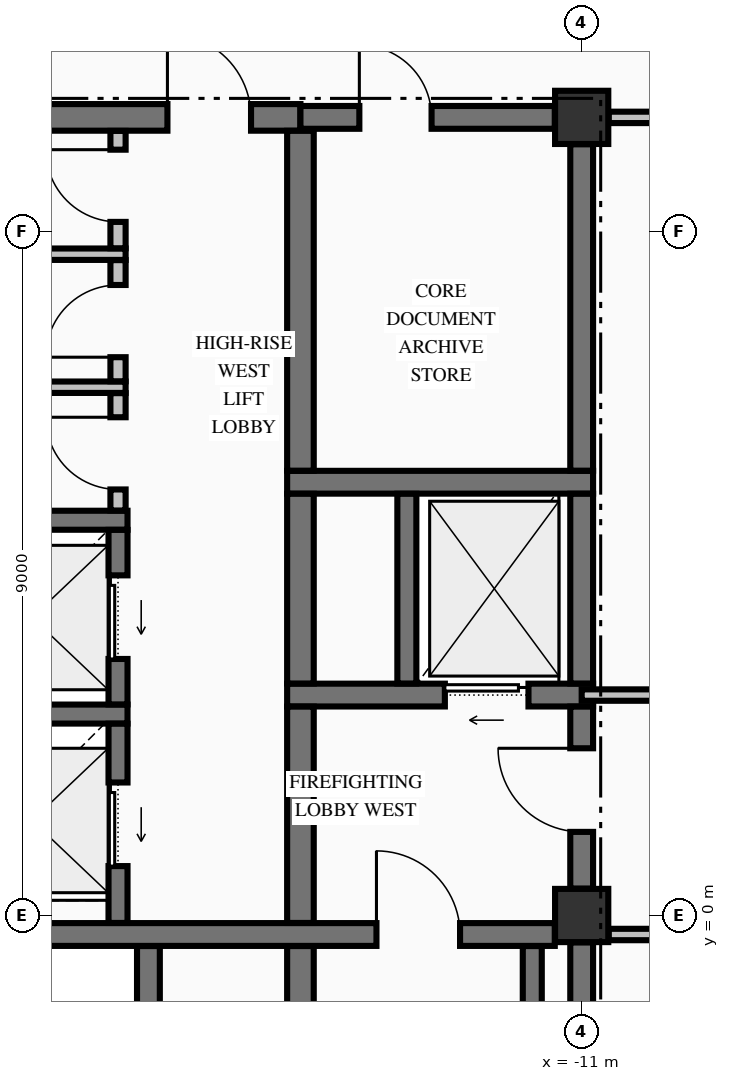
"""IFC4 building model, lengths in metres.
Left out: names, types, materials, properties, quantities, classifications, styles, units other than length and angle.
Written with IfcOpenShell. Run it as: python <this file> out.ifc"""

import sys

from ifc_helpers import new_model, si_unit, direction, frame, frame_2d, origin, origin_2d, place, context, subcontext, project, spatial, rectangle, extrude, element, fill, save


model = new_model("IFC4")
c1 = context("Model", 3, precision=1e-05, world=origin(), true_north=direction((0.0, 1.0)))
c2 = subcontext(c1, "Body", "Model", "MODEL_VIEW")
j1 = project(units=[si_unit("LENGTHUNIT", "METRE"), si_unit("PLANEANGLEUNIT", "RADIAN")], contexts=[c1])
p1 = place(None, origin())
s1 = spatial("IfcSite", under=j1, at=p1, CompositionType="ELEMENT")
p2 = place(p1, origin())
s2 = spatial("IfcBuilding", under=s1, at=p2, CompositionType="ELEMENT")
p3 = place(p2, frame((0.0, 0.0, 242.97)))
s3 = spatial("IfcBuildingStorey", under=s2, at=p3, CompositionType="ELEMENT", Elevation=242.97)
for number, where, z_axis, x_axis in (
    (1, (-11.0, 0.0, -0.25), (0.0, 0.0, 1.0), (1.0, 0.0, 0.0)),
    (2, (-11.0, 10.5, -0.25), (0.0, 0.0, 1.0), (1.0, 0.0, 0.0)),
):
    element("IfcColumn", number, at=place(p3, frame(where, z_axis=z_axis, x_axis=x_axis)), inside=s3, PredefinedType="COLUMN", context=c2, shape_type="SweptSolid", body=[
        extrude(rectangle(XDim=0.7, YDim=0.7, at=origin_2d()), origin(), (0.0, 0.0, 1.0), 3.23),
    ])
p4 = place(p3, frame((-20.571, -0.25, 0.0), z_axis=(0.0, 0.0, 1.0), x_axis=(1.0, 0.0, 0.0)))
e3 = element("IfcWall", 3, at=p4, inside=s3, PredefinedType="SHEAR", context=c2, shape_type="SweptSolid", body=[
    extrude(rectangle(XDim=9.217, YDim=0.3, at=frame_2d((4.608, 0.0))), origin(), (0.0, 0.0, 1.0), 2.98),
])
p5 = place(p4, frame((6.871, 0.0, 0.0)))
e4 = element("IfcOpeningElement", 4, at=p5, cuts=e3, PredefinedType="OPENING", context=c2, shape_type="SweptSolid", body=[
    extrude(rectangle(XDim=1.1, YDim=2.15, at=frame_2d((0.55, 1.075))), frame((0.0, 0.16, 0.0), z_axis=(0.0, -1.0, 0.0), x_axis=(1.0, 0.0, 0.0)), (0.0, 0.0, 1.0), 0.32),
])
p6 = place(p3, frame((-20.175, 2.65, 0.0), z_axis=(0.0, 0.0, 1.0), x_axis=(1.0, 0.0, 0.0)))
e5 = element("IfcWall", 5, at=p6, inside=s3, PredefinedType="SOLIDWALL", context=c2, shape_type="SweptSolid", body=[
    extrude(rectangle(XDim=3.2, YDim=0.25, at=frame_2d((1.6, 0.0))), origin(), (0.0, 0.0, 1.0), 2.98),
])
p7 = place(p3, frame((-14.875, 2.9, 0.0), z_axis=(0.0, 0.0, 1.0), x_axis=(1.0, 0.0, 0.0)))
e6 = element("IfcWall", 6, at=p7, inside=s3, PredefinedType="SHEAR", context=c2, shape_type="SweptSolid", body=[
    extrude(rectangle(XDim=4.025, YDim=0.3, at=frame_2d((2.012, 0.0))), origin(), (0.0, 0.0, 1.0), 2.98),
])
p8 = place(p7, frame((2.075, 0.0, 0.0)))
e7 = element("IfcOpeningElement", 7, at=p8, cuts=e6, PredefinedType="OPENING", context=c2, shape_type="SweptSolid", body=[
    extrude(rectangle(XDim=1.1, YDim=2.2, at=frame_2d((0.55, 1.1))), frame((0.0, 0.16, 0.0), z_axis=(0.0, -1.0, 0.0), x_axis=(1.0, 0.0, 0.0)), (0.0, 0.0, 1.0), 0.32),
])
p9 = place(p3, frame((-20.175, 5.2, 0.0), z_axis=(0.0, 0.0, 1.0), x_axis=(1.0, 0.0, 0.0)))
e8 = element("IfcWall", 8, at=p9, inside=s3, PredefinedType="SOLIDWALL", context=c2, shape_type="SweptSolid", body=[
    extrude(rectangle(XDim=3.2, YDim=0.25, at=frame_2d((1.6, 0.0))), origin(), (0.0, 0.0, 1.0), 2.98),
])
p10 = place(p3, frame((-14.875, 5.7, 0.0), z_axis=(0.0, 0.0, 1.0), x_axis=(1.0, 0.0, 0.0)))
e9 = element("IfcWall", 9, at=p10, inside=s3, PredefinedType="SHEAR", context=c2, shape_type="SweptSolid", body=[
    extrude(rectangle(XDim=4.025, YDim=0.3, at=frame_2d((2.012, 0.0))), origin(), (0.0, 0.0, 1.0), 2.98),
])
p11 = place(p3, frame((-19.646, 10.5, 0.0), z_axis=(0.0, 0.0, 1.0), x_axis=(1.0, 0.0, 0.0)))
e10 = element("IfcWall", 10, at=p11, inside=s3, PredefinedType="SHEAR", context=c2, shape_type="SweptSolid", body=[
    extrude(rectangle(XDim=4.946, YDim=0.35, at=frame_2d((2.473, 0.0))), origin(), (0.0, 0.0, 1.0), 2.98),
])
p12 = place(p11, frame((3.196, 0.0, 0.0)))
e11 = element("IfcOpeningElement", 11, at=p12, cuts=e10, PredefinedType="OPENING", context=c2, shape_type="SweptSolid", body=[
    extrude(rectangle(XDim=1.1, YDim=2.15, at=frame_2d((0.55, 1.075))), frame((0.0, 0.185, 0.0), z_axis=(0.0, -1.0, 0.0), x_axis=(1.0, 0.0, 0.0)), (0.0, 0.0, 1.0), 0.37),
])
p13 = place(p3, frame((-14.7, 10.5, 0.0), z_axis=(0.0, 0.0, 1.0), x_axis=(1.0, 0.0, 0.0)))
e12 = element("IfcWall", 12, at=p13, inside=s3, PredefinedType="SHEAR", context=c2, shape_type="SweptSolid", body=[
    extrude(rectangle(XDim=3.346, YDim=0.3, at=frame_2d((1.673, 0.0))), origin(), (0.0, 0.0, 1.0), 2.98),
])
p14 = place(p13, frame((0.775, 0.0, 0.0)))
e13 = element("IfcOpeningElement", 13, at=p14, cuts=e12, PredefinedType="OPENING", context=c2, shape_type="SweptSolid", body=[
    extrude(rectangle(XDim=0.95, YDim=2.15, at=frame_2d((0.475, 1.075))), frame((0.0, 0.16, 0.0), z_axis=(0.0, -1.0, 0.0), x_axis=(1.0, 0.0, 0.0)), (0.0, 0.0, 1.0), 0.32),
])
p15 = place(p3, frame((-10.644, -0.25, 0.0), z_axis=(0.0, 0.0, 1.0), x_axis=(1.0, 0.0, 0.0)))
e14 = element("IfcWall", 14, at=p15, inside=s3, PredefinedType="PARTITIONING", context=c2, shape_type="SweptSolid", body=[
    extrude(rectangle(XDim=21.288, YDim=0.15, at=frame_2d((10.644, 0.0))), origin(), (0.0, 0.0, 1.0), 2.98),
])
p16 = place(p15, frame((13.544, 0.0, 0.0)))
e15 = element("IfcOpeningElement", 15, at=p16, cuts=e14, PredefinedType="OPENING", context=c2, shape_type="SweptSolid", body=[
    extrude(rectangle(XDim=1.1, YDim=2.15, at=frame_2d((0.55, 1.075))), frame((0.0, 0.085, 0.0), z_axis=(0.0, -1.0, 0.0), x_axis=(1.0, 0.0, 0.0)), (0.0, 0.0, 1.0), 0.17),
])
p17 = place(p15, frame((5.789, 0.0, 0.0)))
e16 = element("IfcOpeningElement", 16, at=p17, cuts=e14, PredefinedType="OPENING", context=c2, shape_type="SweptSolid", body=[
    extrude(rectangle(XDim=1.05, YDim=2.15, at=frame_2d((0.525, 1.075))), frame((0.0, 0.085, 0.0), z_axis=(0.0, -1.0, 0.0), x_axis=(1.0, 0.0, 0.0)), (0.0, 0.0, 1.0), 0.17),
])
p18 = place(p15, frame((17.949, 0.0, 0.0)))
e17 = element("IfcOpeningElement", 17, at=p18, cuts=e14, PredefinedType="OPENING", context=c2, shape_type="SweptSolid", body=[
    extrude(rectangle(XDim=0.95, YDim=2.15, at=frame_2d((0.475, 1.075))), frame((0.0, 0.085, 0.0), z_axis=(0.0, -1.0, 0.0), x_axis=(1.0, 0.0, 0.0)), (0.0, 0.0, 1.0), 0.17),
])
p19 = place(p3, frame((-11.0, 2.9, 0.0), z_axis=(0.0, 0.0, 1.0), x_axis=(1.0, 0.0, 0.0)))
e18 = element("IfcWall", 18, at=p19, inside=s3, PredefinedType="PARTITIONING", context=c2, shape_type="SweptSolid", body=[
    extrude(rectangle(XDim=22.0, YDim=0.15, at=frame_2d((11.0, 0.0))), origin(), (0.0, 0.0, 1.0), 2.98),
])
p20 = place(p19, frame((13.9, 0.0, 0.0)))
e19 = element("IfcOpeningElement", 19, at=p20, cuts=e18, PredefinedType="OPENING", context=c2, shape_type="SweptSolid", body=[
    extrude(rectangle(XDim=1.1, YDim=2.15, at=frame_2d((0.55, 1.075))), frame((0.0, 0.085, 0.0), z_axis=(0.0, -1.0, 0.0), x_axis=(1.0, 0.0, 0.0)), (0.0, 0.0, 1.0), 0.17),
])
p21 = place(p19, frame((6.145, 0.0, 0.0)))
e20 = element("IfcOpeningElement", 20, at=p21, cuts=e18, PredefinedType="OPENING", context=c2, shape_type="SweptSolid", body=[
    extrude(rectangle(XDim=1.05, YDim=2.15, at=frame_2d((0.525, 1.075))), frame((0.0, 0.085, 0.0), z_axis=(0.0, -1.0, 0.0), x_axis=(1.0, 0.0, 0.0)), (0.0, 0.0, 1.0), 0.17),
])
p22 = place(p19, frame((18.23, 0.0, 0.0)))
e21 = element("IfcOpeningElement", 21, at=p22, cuts=e18, PredefinedType="OPENING", context=c2, shape_type="SweptSolid", body=[
    extrude(rectangle(XDim=1.1, YDim=2.15, at=frame_2d((0.55, 1.075))), frame((0.0, 0.085, 0.0), z_axis=(0.0, -1.0, 0.0), x_axis=(1.0, 0.0, 0.0)), (0.0, 0.0, 1.0), 0.17),
])
for number, where, z_axis, x_axis in (
    (22, (-19.822, 6.95, 0.0), (0.0, 0.0, 1.0), (1.0, 0.0, 0.0)),
    (23, (-19.822, 8.7, 0.0), (0.0, 0.0, 1.0), (1.0, 0.0, 0.0)),
):
    element("IfcWall", number, at=place(p3, frame(where, z_axis=z_axis, x_axis=x_axis)), inside=s3, PredefinedType="PARTITIONING", context=c2, shape_type="SweptSolid", body=[
        extrude(rectangle(XDim=2.822, YDim=0.15, at=frame_2d((1.411, 0.0))), origin(), (0.0, 0.0, 1.0), 2.98),
    ])
p23 = place(p3, frame((-10.644, 10.5, 0.0), z_axis=(0.0, 0.0, 1.0), x_axis=(1.0, 0.0, 0.0)))
e24 = element("IfcWall", 24, at=p23, inside=s3, PredefinedType="PARTITIONING", context=c2, shape_type="SweptSolid", body=[
    extrude(rectangle(XDim=21.288, YDim=0.15, at=frame_2d((10.644, 0.0))), origin(), (0.0, 0.0, 1.0), 2.98),
])
p24 = place(p23, frame((13.544, 0.0, 0.0)))
e25 = element("IfcOpeningElement", 25, at=p24, cuts=e24, PredefinedType="OPENING", context=c2, shape_type="SweptSolid", body=[
    extrude(rectangle(XDim=1.1, YDim=2.15, at=frame_2d((0.55, 1.075))), frame((0.0, 0.085, 0.0), z_axis=(0.0, -1.0, 0.0), x_axis=(1.0, 0.0, 0.0)), (0.0, 0.0, 1.0), 0.17),
])
p25 = place(p3, frame((-17.1, -0.098, 0.0), z_axis=(0.0, 0.0, 1.0), x_axis=(0.0, 1.0, 0.0)))
e26 = element("IfcWall", 26, at=p25, inside=s3, PredefinedType="SOLIDWALL", context=c2, shape_type="SweptSolid", body=[
    extrude(rectangle(XDim=2.621, YDim=0.25, at=frame_2d((1.311, 0.0))), origin(), (0.0, 0.0, 1.0), 2.98),
])
p26 = place(p25, frame((0.748, 0.0, 0.0)))
e27 = element("IfcOpeningElement", 27, at=p26, cuts=e26, PredefinedType="OPENING", context=c2, shape_type="SweptSolid", body=[
    extrude(rectangle(XDim=1.1, YDim=2.2, at=frame_2d((0.55, 1.1))), frame((0.0, 0.135, 0.0), z_axis=(0.0, -1.0, 0.0), x_axis=(1.0, 0.0, 0.0)), (0.0, 0.0, 1.0), 0.27),
])
p27 = place(p3, frame((-17.1, 2.777, 0.0), z_axis=(0.0, 0.0, 1.0), x_axis=(0.0, 1.0, 0.0)))
e28 = element("IfcWall", 28, at=p27, inside=s3, PredefinedType="SOLIDWALL", context=c2, shape_type="SweptSolid", body=[
    extrude(rectangle(XDim=2.296, YDim=0.25, at=frame_2d((1.148, 0.0))), origin(), (0.0, 0.0, 1.0), 2.98),
])
p28 = place(p27, frame((0.598, 0.0, 0.0)))
e29 = element("IfcOpeningElement", 29, at=p28, cuts=e28, PredefinedType="OPENING", context=c2, shape_type="SweptSolid", body=[
    extrude(rectangle(XDim=1.1, YDim=2.2, at=frame_2d((0.55, 1.1))), frame((0.0, 0.135, 0.0), z_axis=(0.0, -1.0, 0.0), x_axis=(1.0, 0.0, 0.0)), (0.0, 0.0, 1.0), 0.27),
])
p29 = place(p3, frame((-16.7, -9.773, 0.0), z_axis=(0.0, 0.0, 1.0), x_axis=(0.0, 1.0, 0.0)))
e30 = element("IfcWall", 30, at=p29, inside=s3, PredefinedType="SHEAR", context=c2, shape_type="SweptSolid", body=[
    extrude(rectangle(XDim=9.371, YDim=0.3, at=frame_2d((4.686, 0.0))), origin(), (0.0, 0.0, 1.0), 2.98),
])
p30 = place(p3, frame((-14.7, -9.773, 0.0), z_axis=(0.0, 0.0, 1.0), x_axis=(0.0, 1.0, 0.0)))
e31 = element("IfcWall", 31, at=p30, inside=s3, PredefinedType="SHEAR", context=c2, shape_type="SweptSolid", body=[
    extrude(rectangle(XDim=9.371, YDim=0.35, at=frame_2d((4.686, 0.0))), origin(), (0.0, 0.0, 1.0), 2.98),
])
p31 = place(p3, frame((-14.7, -0.098, 0.0), z_axis=(0.0, 0.0, 1.0), x_axis=(0.0, 1.0, 0.0)))
e32 = element("IfcWall", 32, at=p31, inside=s3, PredefinedType="SHEAR", context=c2, shape_type="SweptSolid", body=[
    extrude(rectangle(XDim=2.846, YDim=0.35, at=frame_2d((1.423, 0.0))), origin(), (0.0, 0.0, 1.0), 2.98),
])
p32 = place(p3, frame((-14.7, 3.052, 0.0), z_axis=(0.0, 0.0, 1.0), x_axis=(0.0, 1.0, 0.0)))
e33 = element("IfcWall", 33, at=p32, inside=s3, PredefinedType="SHEAR", context=c2, shape_type="SweptSolid", body=[
    extrude(rectangle(XDim=2.496, YDim=0.35, at=frame_2d((1.248, 0.0))), origin(), (0.0, 0.0, 1.0), 2.98),
])
p33 = place(p3, frame((-14.7, 5.852, 0.0), z_axis=(0.0, 0.0, 1.0), x_axis=(0.0, 1.0, 0.0)))
e34 = element("IfcWall", 34, at=p33, inside=s3, PredefinedType="SHEAR", context=c2, shape_type="SweptSolid", body=[
    extrude(rectangle(XDim=4.471, YDim=0.35, at=frame_2d((2.235, 0.0))), origin(), (0.0, 0.0, 1.0), 2.98),
])
p34 = place(p3, frame((-13.3, 3.052, 0.0), z_axis=(0.0, 0.0, 1.0), x_axis=(0.0, 1.0, 0.0)))
e35 = element("IfcWall", 35, at=p34, inside=s3, PredefinedType="SOLIDWALL", context=c2, shape_type="SweptSolid", body=[
    extrude(rectangle(XDim=2.496, YDim=0.25, at=frame_2d((1.248, 0.0))), origin(), (0.0, 0.0, 1.0), 2.98),
])
p35 = place(p3, frame((-11.65, -9.798, 0.0), z_axis=(0.0, 0.0, 1.0), x_axis=(0.0, 1.0, 0.0)))
e36 = element("IfcWall", 36, at=p35, inside=s3, PredefinedType="SOLIDWALL", context=c2, shape_type="SweptSolid", body=[
    extrude(rectangle(XDim=9.396, YDim=0.25, at=frame_2d((4.698, 0.0))), origin(), (0.0, 0.0, 1.0), 2.98),
])
p36 = place(p3, frame((-11.0, -9.596, 0.0), z_axis=(0.0, 0.0, 1.0), x_axis=(0.0, 1.0, 0.0)))
e37 = element("IfcWall", 37, at=p36, inside=s3, PredefinedType="SHEAR", context=c2, shape_type="SweptSolid", body=[
    extrude(rectangle(XDim=9.242, YDim=0.3, at=frame_2d((4.621, 0.0))), origin(), (0.0, 0.0, 1.0), 2.98),
])
p37 = place(p3, frame((-11.0, 0.354, 0.0), z_axis=(0.0, 0.0, 1.0), x_axis=(0.0, 1.0, 0.0)))
e38 = element("IfcWall", 38, at=p37, inside=s3, PredefinedType="SHEAR", context=c2, shape_type="SweptSolid", body=[
    extrude(rectangle(XDim=2.394, YDim=0.3, at=frame_2d((1.197, 0.0))), origin(), (0.0, 0.0, 1.0), 2.98),
])
p38 = place(p37, frame((0.746, 0.0, 0.0)))
e39 = element("IfcOpeningElement", 39, at=p38, cuts=e38, PredefinedType="OPENING", context=c2, shape_type="SweptSolid", body=[
    extrude(rectangle(XDim=1.1, YDim=2.15, at=frame_2d((0.55, 1.075))), frame((0.0, 0.16, 0.0), z_axis=(0.0, -1.0, 0.0), x_axis=(1.0, 0.0, 0.0)), (0.0, 0.0, 1.0), 0.32),
])
p39 = place(p3, frame((-11.0, 3.052, 0.0), z_axis=(0.0, 0.0, 1.0), x_axis=(0.0, 1.0, 0.0)))
e40 = element("IfcWall", 40, at=p39, inside=s3, PredefinedType="SHEAR", context=c2, shape_type="SweptSolid", body=[
    extrude(rectangle(XDim=2.496, YDim=0.3, at=frame_2d((1.248, 0.0))), origin(), (0.0, 0.0, 1.0), 2.98),
])
p40 = place(p3, frame((-11.0, 5.852, 0.0), z_axis=(0.0, 0.0, 1.0), x_axis=(0.0, 1.0, 0.0)))
e41 = element("IfcWall", 41, at=p40, inside=s3, PredefinedType="SHEAR", context=c2, shape_type="SweptSolid", body=[
    extrude(rectangle(XDim=4.294, YDim=0.3, at=frame_2d((2.147, 0.0))), origin(), (0.0, 0.0, 1.0), 2.98),
])
p41 = place(p3, frame((-17.1, 5.328, 0.0), z_axis=(0.0, 0.0, 1.0), x_axis=(0.0, 1.0, 0.0)))
e42 = element("IfcWall", 42, at=p41, inside=s3, PredefinedType="PARTITIONING", context=c2, shape_type="SweptSolid", body=[
    extrude(rectangle(XDim=1.544, YDim=0.2, at=frame_2d((0.772, 0.0))), origin(), (0.0, 0.0, 1.0), 2.98),
])
p42 = place(p41, frame((0.277, 0.0, 0.0)))
e43 = element("IfcOpeningElement", 43, at=p42, cuts=e42, PredefinedType="OPENING", context=c2, shape_type="SweptSolid", body=[
    extrude(rectangle(XDim=0.95, YDim=2.15, at=frame_2d((0.475, 1.075))), frame((0.0, 0.11, 0.0), z_axis=(0.0, -1.0, 0.0), x_axis=(1.0, 0.0, 0.0)), (0.0, 0.0, 1.0), 0.22),
])
p43 = place(p3, frame((-17.1, 7.028, 0.0), z_axis=(0.0, 0.0, 1.0), x_axis=(0.0, 1.0, 0.0)))
e44 = element("IfcWall", 44, at=p43, inside=s3, PredefinedType="PARTITIONING", context=c2, shape_type="SweptSolid", body=[
    extrude(rectangle(XDim=1.594, YDim=0.2, at=frame_2d((0.797, 0.0))), origin(), (0.0, 0.0, 1.0), 2.98),
])
p44 = place(p43, frame((0.317, 0.0, 0.0)))
e45 = element("IfcOpeningElement", 45, at=p44, cuts=e44, PredefinedType="OPENING", context=c2, shape_type="SweptSolid", body=[
    extrude(rectangle(XDim=0.95, YDim=2.15, at=frame_2d((0.475, 1.075))), frame((0.0, 0.11, 0.0), z_axis=(0.0, -1.0, 0.0), x_axis=(1.0, 0.0, 0.0)), (0.0, 0.0, 1.0), 0.22),
])
p45 = place(p3, frame((-17.1, 8.778, 0.0), z_axis=(0.0, 0.0, 1.0), x_axis=(0.0, 1.0, 0.0)))
e46 = element("IfcWall", 46, at=p45, inside=s3, PredefinedType="PARTITIONING", context=c2, shape_type="SweptSolid", body=[
    extrude(rectangle(XDim=1.544, YDim=0.2, at=frame_2d((0.772, 0.0))), origin(), (0.0, 0.0, 1.0), 2.98),
])
p46 = place(p45, frame((0.347, 0.0, 0.0)))
e47 = element("IfcOpeningElement", 47, at=p46, cuts=e46, PredefinedType="OPENING", context=c2, shape_type="SweptSolid", body=[
    extrude(rectangle(XDim=0.95, YDim=2.15, at=frame_2d((0.475, 1.075))), frame((0.0, 0.11, 0.0), z_axis=(0.0, -1.0, 0.0), x_axis=(1.0, 0.0, 0.0)), (0.0, 0.0, 1.0), 0.22),
])
p47 = place(p5, origin())
e48 = element("IfcDoor", 48, at=p47, inside=s3, OperationType="SINGLE_SWING_LEFT", PredefinedType="DOOR", context=c2, shape_type="SweptSolid", body=[
    extrude(rectangle(XDim=1.1, YDim=2.15, at=frame_2d((0.55, 1.075))), frame((0.0, 0.025, 0.0), z_axis=(0.0, -1.0, 0.0), x_axis=(1.0, 0.0, 0.0)), (0.0, 0.0, 1.0), 0.05),
])
fill(e4, e48)
p48 = place(p38, origin())
e49 = element("IfcDoor", 49, at=p48, inside=s3, OperationType="SINGLE_SWING_RIGHT", PredefinedType="DOOR", context=c2, shape_type="SweptSolid", body=[
    extrude(rectangle(XDim=1.1, YDim=2.15, at=frame_2d((0.55, 1.075))), frame((0.0, 0.025, 0.0), z_axis=(0.0, -1.0, 0.0), x_axis=(1.0, 0.0, 0.0)), (0.0, 0.0, 1.0), 0.05),
])
fill(e39, e49)
p49 = place(p8, origin())
e50 = element("IfcDoor", 50, at=p49, inside=s3, OperationType="SLIDING_TO_LEFT", PredefinedType="DOOR", context=c2, shape_type="SweptSolid", body=[
    extrude(rectangle(XDim=1.1, YDim=2.2, at=frame_2d((0.55, 1.1))), frame((0.0, 0.025, 0.0), z_axis=(0.0, -1.0, 0.0), x_axis=(1.0, 0.0, 0.0)), (0.0, 0.0, 1.0), 0.05),
])
fill(e7, e50)
p50 = place(p14, origin())
e51 = element("IfcDoor", 51, at=p50, inside=s3, OperationType="SINGLE_SWING_LEFT", PredefinedType="DOOR", context=c2, shape_type="SweptSolid", body=[
    extrude(rectangle(XDim=0.95, YDim=2.15, at=frame_2d((0.475, 1.075))), frame((0.0, 0.025, 0.0), z_axis=(0.0, -1.0, 0.0), x_axis=(1.0, 0.0, 0.0)), (0.0, 0.0, 1.0), 0.05),
])
fill(e13, e51)
p51 = place(p26, origin())
e52 = element("IfcDoor", 52, at=p51, inside=s3, OperationType="SLIDING_TO_LEFT", PredefinedType="DOOR", context=c2, shape_type="SweptSolid", body=[
    extrude(rectangle(XDim=1.1, YDim=2.2, at=frame_2d((0.55, 1.1))), frame((0.0, 0.025, 0.0), z_axis=(0.0, -1.0, 0.0), x_axis=(1.0, 0.0, 0.0)), (0.0, 0.0, 1.0), 0.05),
])
fill(e27, e52)
p52 = place(p28, origin())
e53 = element("IfcDoor", 53, at=p52, inside=s3, OperationType="SLIDING_TO_LEFT", PredefinedType="DOOR", context=c2, shape_type="SweptSolid", body=[
    extrude(rectangle(XDim=1.1, YDim=2.2, at=frame_2d((0.55, 1.1))), frame((0.0, 0.025, 0.0), z_axis=(0.0, -1.0, 0.0), x_axis=(1.0, 0.0, 0.0)), (0.0, 0.0, 1.0), 0.05),
])
fill(e29, e53)
p53 = place(p12, origin())
e54 = element("IfcDoor", 54, at=p53, inside=s3, OperationType="SINGLE_SWING_LEFT", PredefinedType="DOOR", context=c2, shape_type="SweptSolid", body=[
    extrude(rectangle(XDim=1.1, YDim=2.15, at=frame_2d((0.55, 1.075))), frame((0.0, 0.025, 0.0), z_axis=(0.0, -1.0, 0.0), x_axis=(1.0, 0.0, 0.0)), (0.0, 0.0, 1.0), 0.05),
])
fill(e11, e54)
p54 = place(p46, origin())
e55 = element("IfcDoor", 55, at=p54, inside=s3, OperationType="SINGLE_SWING_RIGHT", PredefinedType="DOOR", context=c2, shape_type="SweptSolid", body=[
    extrude(rectangle(XDim=0.95, YDim=2.15, at=frame_2d((0.475, 1.075))), frame((0.0, 0.025, 0.0), z_axis=(0.0, -1.0, 0.0), x_axis=(1.0, 0.0, 0.0)), (0.0, 0.0, 1.0), 0.05),
])
fill(e47, e55)
p55 = place(p44, origin())
e56 = element("IfcDoor", 56, at=p55, inside=s3, OperationType="SINGLE_SWING_LEFT", PredefinedType="DOOR", context=c2, shape_type="SweptSolid", body=[
    extrude(rectangle(XDim=0.95, YDim=2.15, at=frame_2d((0.475, 1.075))), frame((0.0, 0.025, 0.0), z_axis=(0.0, -1.0, 0.0), x_axis=(1.0, 0.0, 0.0)), (0.0, 0.0, 1.0), 0.05),
])
fill(e45, e56)
p56 = place(p42, origin())
e57 = element("IfcDoor", 57, at=p56, inside=s3, OperationType="SINGLE_SWING_RIGHT", PredefinedType="DOOR", context=c2, shape_type="SweptSolid", body=[
    extrude(rectangle(XDim=0.95, YDim=2.15, at=frame_2d((0.475, 1.075))), frame((0.0, 0.025, 0.0), z_axis=(0.0, -1.0, 0.0), x_axis=(1.0, 0.0, 0.0)), (0.0, 0.0, 1.0), 0.05),
])
fill(e43, e57)
save(model, sys.argv[1])
